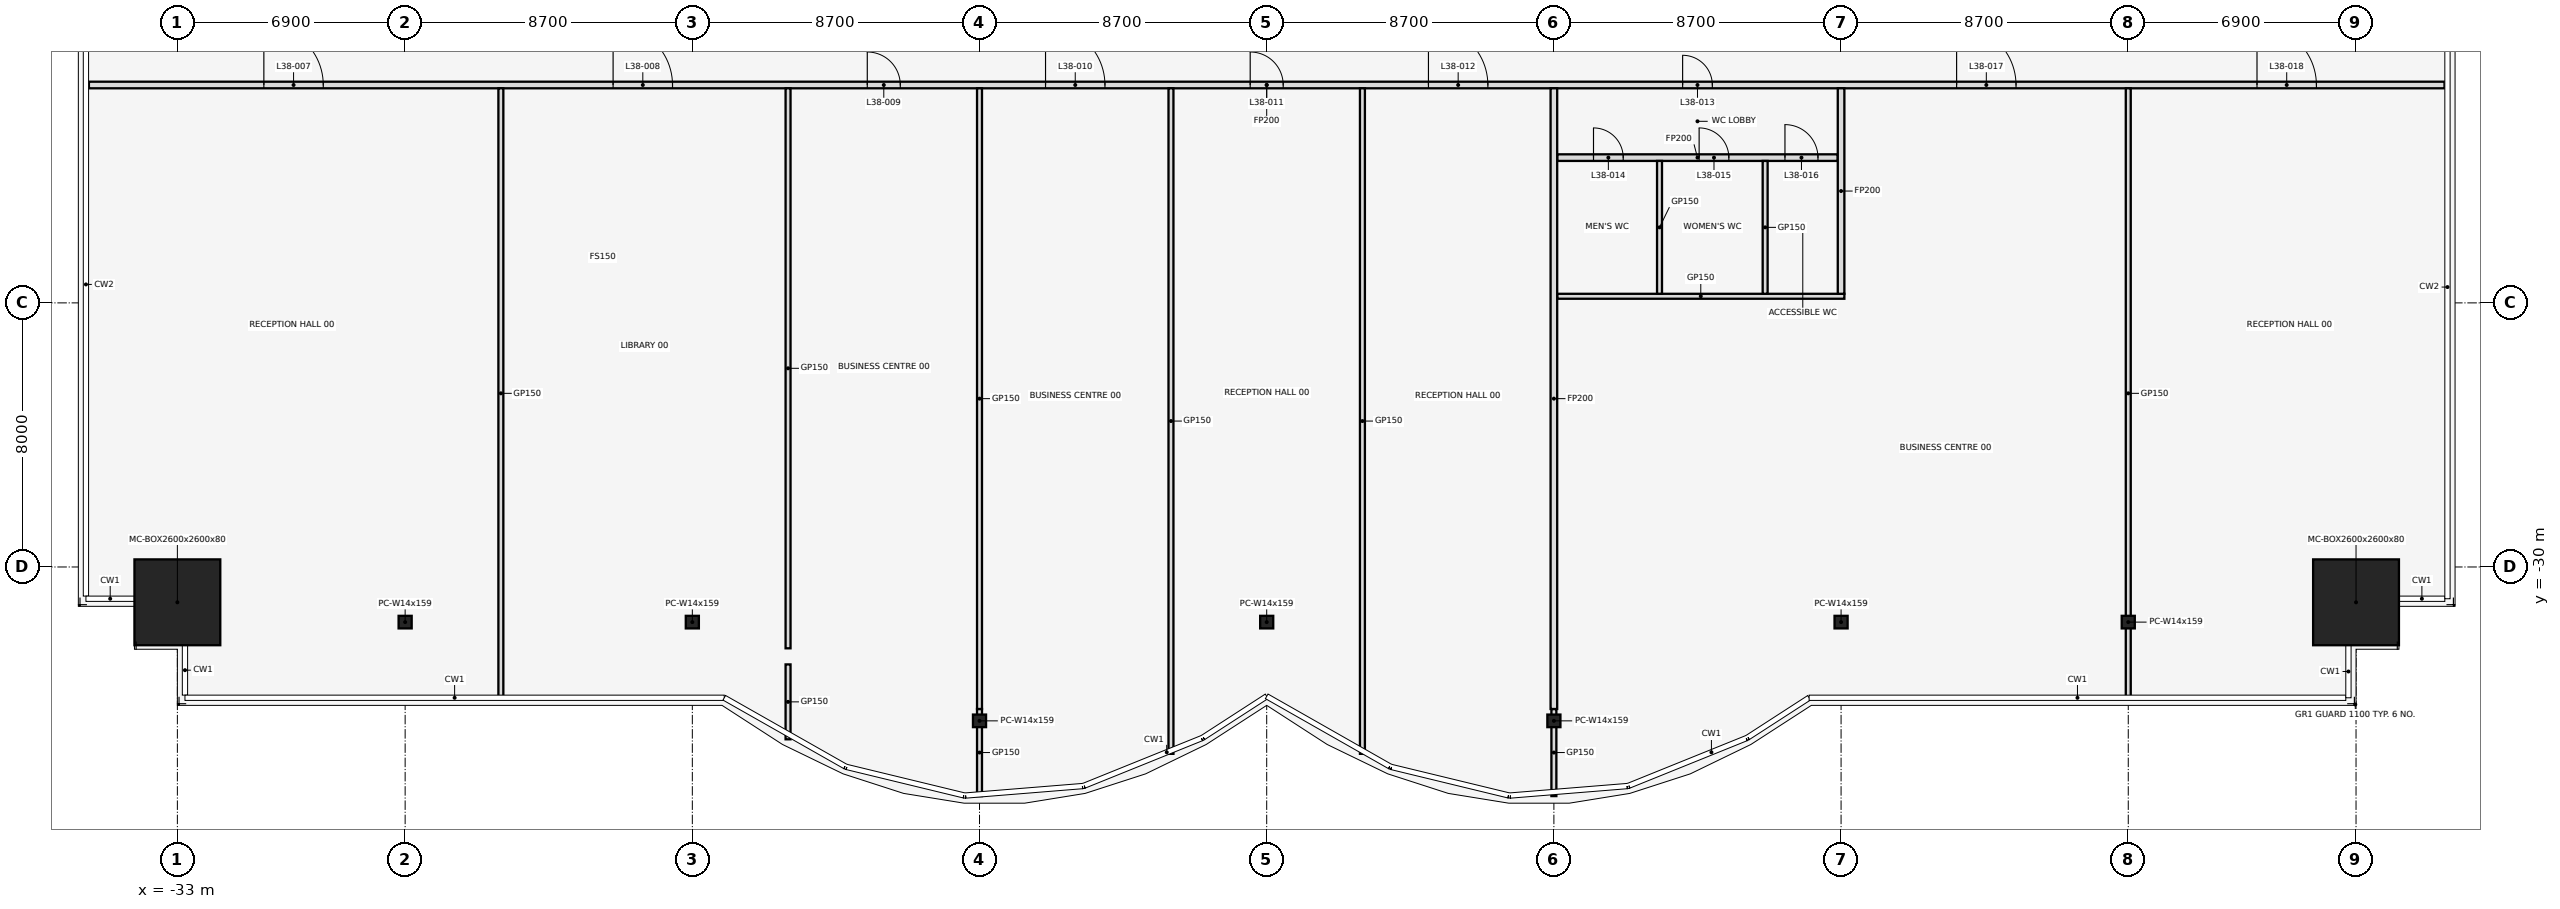
"""IFC4 building model, lengths in metres.
Left out: names, types, materials, properties, quantities, classifications, styles, units other than length and angle.
Written with IfcOpenShell. Run it as: python <this file> out.ifc"""

import sys

from ifc_helpers import new_model, si_unit, direction, frame, frame_2d, origin, origin_2d, place, context, subcontext, project, spatial, rectangle, hollow_rectangle, i_section, extrude, element, fill, save


model = new_model("IFC4")
c1 = context("Model", 3, precision=1e-05, world=origin(), true_north=direction((0.0, 1.0)))
c2 = subcontext(c1, "Body", "Model", "MODEL_VIEW")
j1 = project(units=[si_unit("LENGTHUNIT", "METRE"), si_unit("PLANEANGLEUNIT", "RADIAN")], contexts=[c1])
p1 = place(None, origin())
s1 = spatial("IfcSite", under=j1, at=p1, CompositionType="ELEMENT")
p2 = place(p1, origin())
s2 = spatial("IfcBuilding", under=s1, at=p2, CompositionType="ELEMENT")
p3 = place(p2, frame((0.0, 0.0, 173.2)))
s3 = spatial("IfcBuildingStorey", under=s2, at=p3, CompositionType="ELEMENT", Elevation=173.2)
p4 = place(p3, frame((-33.0, -31.07, 0.0), z_axis=(0.0, 0.0, 1.0), x_axis=(1.0, 0.0, 0.0)))
e1 = element("IfcColumn", 1, at=p4, inside=s3, PredefinedType="COLUMN", context=c2, shape_type="SweptSolid", body=[
    extrude(hollow_rectangle(XDim=2.6, YDim=2.6, WallThickness=0.08, at=origin_2d()), origin(), (0.0, 0.0, 1.0), 4.1),
])
for number, where, z_axis, x_axis in (
    (2, (-26.1, -31.67, 0.0), (0.0, 0.0, 1.0), (1.0, 0.0, 0.0)),
    (3, (-17.4, -31.67, 0.0), (0.0, 0.0, 1.0), (1.0, 0.0, 0.0)),
    (4, (-8.7, -34.661, 0.0), (0.0, 0.0, 1.0), (1.0, 0.0, 0.0)),
    (5, (0.0, -31.67, 0.0), (0.0, 0.0, 1.0), (1.0, 0.0, 0.0)),
    (6, (8.7, -34.661, 0.0), (0.0, 0.0, 1.0), (1.0, 0.0, 0.0)),
    (7, (17.4, -31.67, 0.0), (0.0, 0.0, 1.0), (1.0, 0.0, 0.0)),
    (8, (26.1, -31.67, 0.0), (0.0, 0.0, 1.0), (1.0, 0.0, 0.0)),
):
    element("IfcColumn", number, at=place(p3, frame(where, z_axis=z_axis, x_axis=x_axis)), inside=s3, PredefinedType="COLUMN", context=c2, shape_type="SweptSolid", body=[
        extrude(i_section(OverallWidth=0.396, OverallDepth=0.381, WebThickness=0.019, FlangeThickness=0.03, at=origin_2d()), origin(), (0.0, 0.0, 1.0), 4.1),
    ])
p5 = place(p3, frame((33.0, -31.07, 0.0), z_axis=(0.0, 0.0, 1.0), x_axis=(1.0, 0.0, 0.0)))
e9 = element("IfcColumn", 9, at=p5, inside=s3, PredefinedType="COLUMN", context=c2, shape_type="SweptSolid", body=[
    extrude(hollow_rectangle(XDim=2.6, YDim=2.6, WallThickness=0.08, at=origin_2d()), origin(), (0.0, 0.0, 1.0), 4.1),
])
p6 = place(p3, frame((8.8, -21.8, 0.0), z_axis=(0.0, 0.0, 1.0), x_axis=(1.0, 0.0, 0.0)))
e10 = element("IfcWall", 10, at=p6, inside=s3, PredefinedType="PARTITIONING", context=c2, shape_type="SweptSolid", body=[
    extrude(rectangle(XDim=8.7, YDim=0.15, at=frame_2d((4.35, 0.0))), origin(), (0.0, 0.0, 1.0), 2.84),
])
p7 = place(p3, frame((8.8, -17.6, 0.0), z_axis=(0.0, 0.0, 1.0), x_axis=(1.0, 0.0, 0.0)))
e11 = element("IfcWall", 11, at=p7, inside=s3, PredefinedType="PARTITIONING", context=c2, shape_type="SweptSolid", body=[
    extrude(rectangle(XDim=8.5, YDim=0.2, at=frame_2d((4.25, 0.0))), origin(), (0.0, 0.0, 1.0), 2.84),
])
p8 = place(p7, frame((1.1, 0.0, 0.0)))
e12 = element("IfcOpeningElement", 12, at=p8, cuts=e11, PredefinedType="OPENING", context=c2, shape_type="SweptSolid", body=[
    extrude(rectangle(XDim=0.9, YDim=2.1, at=frame_2d((0.45, 1.05))), frame((0.0, 0.112, 0.0), z_axis=(0.0, -1.0, 0.0), x_axis=(1.0, 0.0, 0.0)), (0.0, 0.0, 1.0), 0.224),
])
p9 = place(p7, frame((4.3, 0.0, 0.0)))
e13 = element("IfcOpeningElement", 13, at=p9, cuts=e11, PredefinedType="OPENING", context=c2, shape_type="SweptSolid", body=[
    extrude(rectangle(XDim=0.9, YDim=2.1, at=frame_2d((0.45, 1.05))), frame((0.0, 0.112, 0.0), z_axis=(0.0, -1.0, 0.0), x_axis=(1.0, 0.0, 0.0)), (0.0, 0.0, 1.0), 0.224),
])
p10 = place(p7, frame((6.9, 0.0, 0.0)))
e14 = element("IfcOpeningElement", 14, at=p10, cuts=e11, PredefinedType="OPENING", context=c2, shape_type="SweptSolid", body=[
    extrude(rectangle(XDim=1.0, YDim=2.1, at=frame_2d((0.5, 1.05))), frame((0.0, 0.112, 0.0), z_axis=(0.0, -1.0, 0.0), x_axis=(1.0, 0.0, 0.0)), (0.0, 0.0, 1.0), 0.224),
])
p11 = place(p3, frame((-35.68, -15.4, 0.0), z_axis=(0.0, 0.0, 1.0), x_axis=(1.0, 0.0, 0.0)))
e15 = element("IfcWall", 15, at=p11, inside=s3, PredefinedType="PARTITIONING", context=c2, shape_type="SweptSolid", body=[
    extrude(rectangle(XDim=71.36, YDim=0.2, at=frame_2d((35.68, 0.0))), origin(), (0.0, 0.0, 1.0), 2.84),
])
p12 = place(p11, frame((5.3, 0.0, 0.0)))
e16 = element("IfcOpeningElement", 16, at=p12, cuts=e15, PredefinedType="OPENING", context=c2, shape_type="SweptSolid", body=[
    extrude(rectangle(XDim=1.8, YDim=2.1, at=frame_2d((0.9, 1.05))), frame((0.0, 0.112, 0.0), z_axis=(0.0, -1.0, 0.0), x_axis=(1.0, 0.0, 0.0)), (0.0, 0.0, 1.0), 0.224),
])
p13 = place(p11, frame((15.88, 0.0, 0.0)))
e17 = element("IfcOpeningElement", 17, at=p13, cuts=e15, PredefinedType="OPENING", context=c2, shape_type="SweptSolid", body=[
    extrude(rectangle(XDim=1.8, YDim=2.1, at=frame_2d((0.9, 1.05))), frame((0.0, 0.112, 0.0), z_axis=(0.0, -1.0, 0.0), x_axis=(1.0, 0.0, 0.0)), (0.0, 0.0, 1.0), 0.224),
])
p14 = place(p11, frame((23.58, 0.0, 0.0)))
e18 = element("IfcOpeningElement", 18, at=p14, cuts=e15, PredefinedType="OPENING", context=c2, shape_type="SweptSolid", body=[
    extrude(rectangle(XDim=1.0, YDim=2.1, at=frame_2d((0.5, 1.05))), frame((0.0, 0.112, 0.0), z_axis=(0.0, -1.0, 0.0), x_axis=(1.0, 0.0, 0.0)), (0.0, 0.0, 1.0), 0.224),
])
p15 = place(p11, frame((28.98, 0.0, 0.0)))
e19 = element("IfcOpeningElement", 19, at=p15, cuts=e15, PredefinedType="OPENING", context=c2, shape_type="SweptSolid", body=[
    extrude(rectangle(XDim=1.8, YDim=2.1, at=frame_2d((0.9, 1.05))), frame((0.0, 0.112, 0.0), z_axis=(0.0, -1.0, 0.0), x_axis=(1.0, 0.0, 0.0)), (0.0, 0.0, 1.0), 0.224),
])
p16 = place(p11, frame((35.18, 0.0, 0.0)))
e20 = element("IfcOpeningElement", 20, at=p16, cuts=e15, PredefinedType="OPENING", context=c2, shape_type="SweptSolid", body=[
    extrude(rectangle(XDim=1.0, YDim=2.1, at=frame_2d((0.5, 1.05))), frame((0.0, 0.112, 0.0), z_axis=(0.0, -1.0, 0.0), x_axis=(1.0, 0.0, 0.0)), (0.0, 0.0, 1.0), 0.224),
])
p17 = place(p11, frame((40.58, 0.0, 0.0)))
e21 = element("IfcOpeningElement", 21, at=p17, cuts=e15, PredefinedType="OPENING", context=c2, shape_type="SweptSolid", body=[
    extrude(rectangle(XDim=1.8, YDim=2.1, at=frame_2d((0.9, 1.05))), frame((0.0, 0.112, 0.0), z_axis=(0.0, -1.0, 0.0), x_axis=(1.0, 0.0, 0.0)), (0.0, 0.0, 1.0), 0.224),
])
p18 = place(p11, frame((48.28, 0.0, 0.0)))
e22 = element("IfcOpeningElement", 22, at=p18, cuts=e15, PredefinedType="OPENING", context=c2, shape_type="SweptSolid", body=[
    extrude(rectangle(XDim=0.9, YDim=2.1, at=frame_2d((0.45, 1.05))), frame((0.0, 0.112, 0.0), z_axis=(0.0, -1.0, 0.0), x_axis=(1.0, 0.0, 0.0)), (0.0, 0.0, 1.0), 0.224),
])
p19 = place(p11, frame((56.58, 0.0, 0.0)))
e23 = element("IfcOpeningElement", 23, at=p19, cuts=e15, PredefinedType="OPENING", context=c2, shape_type="SweptSolid", body=[
    extrude(rectangle(XDim=1.8, YDim=2.1, at=frame_2d((0.9, 1.05))), frame((0.0, 0.112, 0.0), z_axis=(0.0, -1.0, 0.0), x_axis=(1.0, 0.0, 0.0)), (0.0, 0.0, 1.0), 0.224),
])
p20 = place(p11, frame((65.68, 0.0, 0.0)))
e24 = element("IfcOpeningElement", 24, at=p20, cuts=e15, PredefinedType="OPENING", context=c2, shape_type="SweptSolid", body=[
    extrude(rectangle(XDim=1.8, YDim=2.1, at=frame_2d((0.9, 1.05))), frame((0.0, 0.112, 0.0), z_axis=(0.0, -1.0, 0.0), x_axis=(1.0, 0.0, 0.0)), (0.0, 0.0, 1.0), 0.224),
])
p21 = place(p3, frame((-23.2, -33.98, 0.0), z_axis=(0.0, 0.0, 1.0), x_axis=(0.0, 1.0, 0.0)))
e25 = element("IfcWall", 25, at=p21, inside=s3, PredefinedType="PARTITIONING", context=c2, shape_type="SweptSolid", body=[
    extrude(rectangle(XDim=18.48, YDim=0.15, at=frame_2d((9.24, 0.0))), origin(), (0.0, 0.0, 1.0), 2.84),
])
p22 = place(p3, frame((-14.5, -35.22, 0.0), z_axis=(0.0, 0.0, 1.0), x_axis=(0.0, 1.0, 0.0)))
e26 = element("IfcWall", 26, at=p22, inside=s3, PredefinedType="PARTITIONING", context=c2, shape_type="SweptSolid", body=[
    extrude(rectangle(XDim=2.269, YDim=0.15, at=frame_2d((1.134, 0.0))), origin(), (0.0, 0.0, 1.0), 2.84),
])
p23 = place(p3, frame((-14.5, -32.464, 0.0), z_axis=(0.0, 0.0, 1.0), x_axis=(0.0, 1.0, 0.0)))
e27 = element("IfcWall", 27, at=p23, inside=s3, PredefinedType="PARTITIONING", context=c2, shape_type="SweptSolid", body=[
    extrude(rectangle(XDim=16.964, YDim=0.15, at=frame_2d((8.482, 0.0))), origin(), (0.0, 0.0, 1.0), 2.84),
])
p24 = place(p3, frame((-8.7, -36.94, 0.0), z_axis=(0.0, 0.0, 1.0), x_axis=(0.0, 1.0, 0.0)))
e28 = element("IfcWall", 28, at=p24, inside=s3, PredefinedType="PARTITIONING", context=c2, shape_type="SweptSolid", body=[
    extrude(rectangle(XDim=2.638, YDim=0.15, at=frame_2d((1.319, 0.0))), origin(), (0.0, 0.0, 1.0), 2.84),
])
p25 = place(p3, frame((-8.7, -34.302, 0.0), z_axis=(0.0, 0.0, 1.0), x_axis=(0.0, 1.0, 0.0)))
e29 = element("IfcWall", 29, at=p25, inside=s3, PredefinedType="PARTITIONING", context=c2, shape_type="SweptSolid", body=[
    extrude(rectangle(XDim=18.802, YDim=0.15, at=frame_2d((9.401, 0.0))), origin(), (0.0, 0.0, 1.0), 2.84),
])
for number, where, z_axis, x_axis in (
    (30, (-2.9, -35.66, 0.0), (0.0, 0.0, 1.0), (0.0, 1.0, 0.0)),
    (31, (2.9, -35.66, 0.0), (0.0, 0.0, 1.0), (0.0, 1.0, 0.0)),
):
    element("IfcWall", number, at=place(p3, frame(where, z_axis=z_axis, x_axis=x_axis)), inside=s3, PredefinedType="PARTITIONING", context=c2, shape_type="SweptSolid", body=[
        extrude(rectangle(XDim=20.16, YDim=0.15, at=frame_2d((10.08, 0.0))), origin(), (0.0, 0.0, 1.0), 2.84),
    ])
p26 = place(p3, frame((8.7, -36.94, 0.0), z_axis=(0.0, 0.0, 1.0), x_axis=(0.0, 1.0, 0.0)))
e32 = element("IfcWall", 32, at=p26, inside=s3, PredefinedType="PARTITIONING", context=c2, shape_type="SweptSolid", body=[
    extrude(rectangle(XDim=2.638, YDim=0.15, at=frame_2d((1.319, 0.0))), origin(), (0.0, 0.0, 1.0), 2.84),
])
p27 = place(p3, frame((8.7, -34.302, 0.0), z_axis=(0.0, 0.0, 1.0), x_axis=(0.0, 1.0, 0.0)))
e33 = element("IfcWall", 33, at=p27, inside=s3, PredefinedType="PARTITIONING", context=c2, shape_type="SweptSolid", body=[
    extrude(rectangle(XDim=18.802, YDim=0.2, at=frame_2d((9.401, 0.0))), origin(), (0.0, 0.0, 1.0), 2.84),
])
for number, where, z_axis, x_axis in (
    (34, (11.9, -21.725, 0.0), (0.0, 0.0, 1.0), (0.0, 1.0, 0.0)),
    (35, (15.1, -21.725, 0.0), (0.0, 0.0, 1.0), (0.0, 1.0, 0.0)),
):
    element("IfcWall", number, at=place(p3, frame(where, z_axis=z_axis, x_axis=x_axis)), inside=s3, PredefinedType="PARTITIONING", context=c2, shape_type="SweptSolid", body=[
        extrude(rectangle(XDim=4.025, YDim=0.15, at=frame_2d((2.013, 0.0))), origin(), (0.0, 0.0, 1.0), 2.84),
    ])
p28 = place(p3, frame((17.4, -21.725, 0.0), z_axis=(0.0, 0.0, 1.0), x_axis=(0.0, 1.0, 0.0)))
e36 = element("IfcWall", 36, at=p28, inside=s3, PredefinedType="PARTITIONING", context=c2, shape_type="SweptSolid", body=[
    extrude(rectangle(XDim=6.225, YDim=0.2, at=frame_2d((3.113, 0.0))), origin(), (0.0, 0.0, 1.0), 2.84),
])
p29 = place(p3, frame((26.1, -33.98, 0.0), z_axis=(0.0, 0.0, 1.0), x_axis=(0.0, 1.0, 0.0)))
e37 = element("IfcWall", 37, at=p29, inside=s3, PredefinedType="PARTITIONING", context=c2, shape_type="SweptSolid", body=[
    extrude(rectangle(XDim=18.48, YDim=0.15, at=frame_2d((9.24, 0.0))), origin(), (0.0, 0.0, 1.0), 2.84),
])
p30 = place(p12, origin())
e38 = element("IfcDoor", 38, at=p30, inside=s3, OperationType="SINGLE_SWING_LEFT", PredefinedType="DOOR", context=c2, shape_type="SweptSolid", body=[
    extrude(rectangle(XDim=1.8, YDim=2.1, at=frame_2d((0.9, 1.05))), frame((0.0, 0.025, 0.0), z_axis=(0.0, -1.0, 0.0), x_axis=(1.0, 0.0, 0.0)), (0.0, 0.0, 1.0), 0.05),
])
fill(e16, e38)
p31 = place(p13, origin())
e39 = element("IfcDoor", 39, at=p31, inside=s3, OperationType="SINGLE_SWING_LEFT", PredefinedType="DOOR", context=c2, shape_type="SweptSolid", body=[
    extrude(rectangle(XDim=1.8, YDim=2.1, at=frame_2d((0.9, 1.05))), frame((0.0, 0.025, 0.0), z_axis=(0.0, -1.0, 0.0), x_axis=(1.0, 0.0, 0.0)), (0.0, 0.0, 1.0), 0.05),
])
fill(e17, e39)
p32 = place(p14, frame((1.0, 0.0, 0.0), z_axis=(0.0, 0.0, 1.0), x_axis=(-1.0, 0.0, 0.0)))
e40 = element("IfcDoor", 40, at=p32, inside=s3, OperationType="SINGLE_SWING_RIGHT", PredefinedType="DOOR", context=c2, shape_type="SweptSolid", body=[
    extrude(rectangle(XDim=1.0, YDim=2.1, at=frame_2d((0.5, 1.05))), frame((0.0, 0.025, 0.0), z_axis=(0.0, -1.0, 0.0), x_axis=(1.0, 0.0, 0.0)), (0.0, 0.0, 1.0), 0.05),
])
fill(e18, e40)
p33 = place(p15, origin())
e41 = element("IfcDoor", 41, at=p33, inside=s3, OperationType="SINGLE_SWING_LEFT", PredefinedType="DOOR", context=c2, shape_type="SweptSolid", body=[
    extrude(rectangle(XDim=1.8, YDim=2.1, at=frame_2d((0.9, 1.05))), frame((0.0, 0.025, 0.0), z_axis=(0.0, -1.0, 0.0), x_axis=(1.0, 0.0, 0.0)), (0.0, 0.0, 1.0), 0.05),
])
fill(e19, e41)
p34 = place(p16, frame((1.0, 0.0, 0.0), z_axis=(0.0, 0.0, 1.0), x_axis=(-1.0, 0.0, 0.0)))
e42 = element("IfcDoor", 42, at=p34, inside=s3, OperationType="SINGLE_SWING_RIGHT", PredefinedType="DOOR", context=c2, shape_type="SweptSolid", body=[
    extrude(rectangle(XDim=1.0, YDim=2.1, at=frame_2d((0.5, 1.05))), frame((0.0, 0.025, 0.0), z_axis=(0.0, -1.0, 0.0), x_axis=(1.0, 0.0, 0.0)), (0.0, 0.0, 1.0), 0.05),
])
fill(e20, e42)
p35 = place(p17, origin())
e43 = element("IfcDoor", 43, at=p35, inside=s3, OperationType="SINGLE_SWING_LEFT", PredefinedType="DOOR", context=c2, shape_type="SweptSolid", body=[
    extrude(rectangle(XDim=1.8, YDim=2.1, at=frame_2d((0.9, 1.05))), frame((0.0, 0.025, 0.0), z_axis=(0.0, -1.0, 0.0), x_axis=(1.0, 0.0, 0.0)), (0.0, 0.0, 1.0), 0.05),
])
fill(e21, e43)
p36 = place(p18, frame((0.9, 0.0, 0.0), z_axis=(0.0, 0.0, 1.0), x_axis=(-1.0, 0.0, 0.0)))
e44 = element("IfcDoor", 44, at=p36, inside=s3, OperationType="SINGLE_SWING_LEFT", PredefinedType="DOOR", context=c2, shape_type="SweptSolid", body=[
    extrude(rectangle(XDim=0.9, YDim=2.1, at=frame_2d((0.45, 1.05))), frame((0.0, 0.025, 0.0), z_axis=(0.0, -1.0, 0.0), x_axis=(1.0, 0.0, 0.0)), (0.0, 0.0, 1.0), 0.05),
])
fill(e22, e44)
p37 = place(p8, frame((0.9, 0.0, 0.0), z_axis=(0.0, 0.0, 1.0), x_axis=(-1.0, 0.0, 0.0)))
e45 = element("IfcDoor", 45, at=p37, inside=s3, OperationType="SINGLE_SWING_RIGHT", PredefinedType="DOOR", context=c2, shape_type="SweptSolid", body=[
    extrude(rectangle(XDim=0.9, YDim=2.1, at=frame_2d((0.45, 1.05))), frame((0.0, 0.025, 0.0), z_axis=(0.0, -1.0, 0.0), x_axis=(1.0, 0.0, 0.0)), (0.0, 0.0, 1.0), 0.05),
])
fill(e12, e45)
p38 = place(p9, frame((0.9, 0.0, 0.0), z_axis=(0.0, 0.0, 1.0), x_axis=(-1.0, 0.0, 0.0)))
e46 = element("IfcDoor", 46, at=p38, inside=s3, OperationType="SINGLE_SWING_RIGHT", PredefinedType="DOOR", context=c2, shape_type="SweptSolid", body=[
    extrude(rectangle(XDim=0.9, YDim=2.1, at=frame_2d((0.45, 1.05))), frame((0.0, 0.025, 0.0), z_axis=(0.0, -1.0, 0.0), x_axis=(1.0, 0.0, 0.0)), (0.0, 0.0, 1.0), 0.05),
])
fill(e13, e46)
p39 = place(p10, frame((1.0, 0.0, 0.0), z_axis=(0.0, 0.0, 1.0), x_axis=(-1.0, 0.0, 0.0)))
e47 = element("IfcDoor", 47, at=p39, inside=s3, OperationType="SINGLE_SWING_LEFT", PredefinedType="DOOR", context=c2, shape_type="SweptSolid", body=[
    extrude(rectangle(XDim=1.0, YDim=2.1, at=frame_2d((0.5, 1.05))), frame((0.0, 0.025, 0.0), z_axis=(0.0, -1.0, 0.0), x_axis=(1.0, 0.0, 0.0)), (0.0, 0.0, 1.0), 0.05),
])
fill(e14, e47)
p40 = place(p19, origin())
e48 = element("IfcDoor", 48, at=p40, inside=s3, OperationType="SINGLE_SWING_LEFT", PredefinedType="DOOR", context=c2, shape_type="SweptSolid", body=[
    extrude(rectangle(XDim=1.8, YDim=2.1, at=frame_2d((0.9, 1.05))), frame((0.0, 0.025, 0.0), z_axis=(0.0, -1.0, 0.0), x_axis=(1.0, 0.0, 0.0)), (0.0, 0.0, 1.0), 0.05),
])
fill(e23, e48)
p41 = place(p20, origin())
e49 = element("IfcDoor", 49, at=p41, inside=s3, OperationType="SINGLE_SWING_LEFT", PredefinedType="DOOR", context=c2, shape_type="SweptSolid", body=[
    extrude(rectangle(XDim=1.8, YDim=2.1, at=frame_2d((0.9, 1.05))), frame((0.0, 0.025, 0.0), z_axis=(0.0, -1.0, 0.0), x_axis=(1.0, 0.0, 0.0)), (0.0, 0.0, 1.0), 0.05),
])
fill(e24, e49)
save(model, sys.argv[1])
